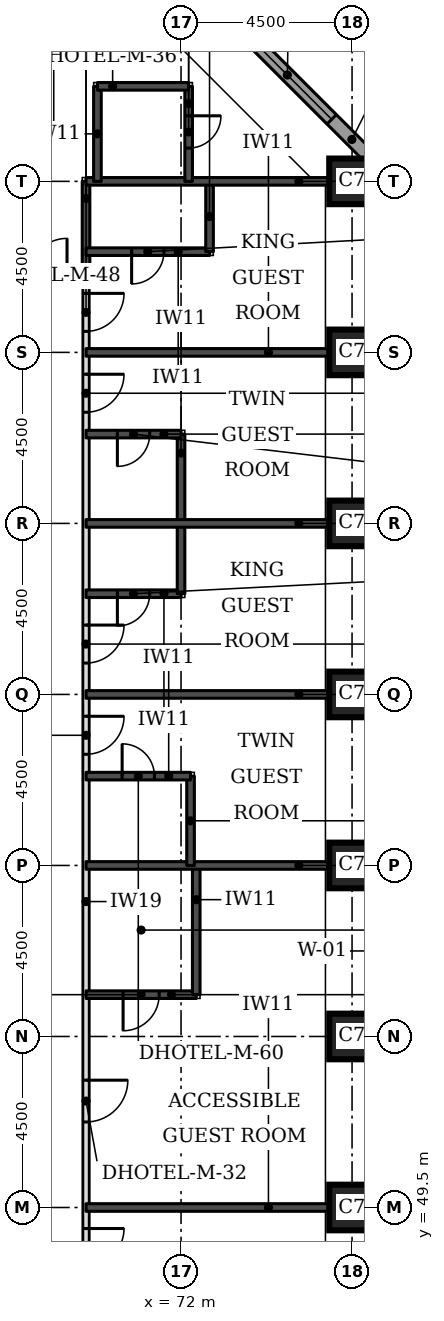
"""IFC4 building model, lengths in metres.
Left out: names, types, materials, properties, quantities, classifications, styles, units other than length and angle.
Written with IfcOpenShell. Run it as: python <this file> out.ifc"""

import sys

from ifc_helpers import new_model, si_unit, direction, frame, frame_2d, origin, origin_2d, place, context, subcontext, project, spatial, rectangle, extrude, element, fill, save


model = new_model("IFC4")
c1 = context("Model", 3, precision=1e-05, world=origin(), true_north=direction((0.0, 1.0)))
c2 = subcontext(c1, "Body", "Model", "MODEL_VIEW")
j1 = project(units=[si_unit("LENGTHUNIT", "METRE"), si_unit("PLANEANGLEUNIT", "RADIAN")], contexts=[c1])
p1 = place(None, origin())
s1 = spatial("IfcSite", under=j1, at=p1, CompositionType="ELEMENT")
p2 = place(p1, origin())
s2 = spatial("IfcBuilding", under=s1, at=p2, CompositionType="ELEMENT")
p3 = place(p2, frame((0.0, 0.0, 23.1)))
s3 = spatial("IfcBuildingStorey", under=s2, at=p3, CompositionType="ELEMENT", Elevation=23.1)
for number, where, z_axis, x_axis in (
    (1, (76.5, 49.5, 0.0), (0.0, 0.0, 1.0), (1.0, 0.0, 0.0)),
    (2, (76.5, 54.0, 0.0), (0.0, 0.0, 1.0), (1.0, 0.0, 0.0)),
    (3, (76.5, 58.5, 0.0), (0.0, 0.0, 1.0), (1.0, 0.0, 0.0)),
    (4, (76.5, 63.0, 0.0), (0.0, 0.0, 1.0), (1.0, 0.0, 0.0)),
    (5, (76.5, 67.5, 0.0), (0.0, 0.0, 1.0), (1.0, 0.0, 0.0)),
    (6, (76.5, 72.0, 0.0), (0.0, 0.0, 1.0), (1.0, 0.0, 0.0)),
    (7, (76.5, 76.5, 0.0), (0.0, 0.0, 1.0), (1.0, 0.0, 0.0)),
):
    element("IfcColumn", number, at=place(p3, frame(where, z_axis=z_axis, x_axis=x_axis)), inside=s3, PredefinedType="COLUMN", context=c2, shape_type="SweptSolid", body=[
        extrude(rectangle(XDim=1.2, YDim=1.2, at=origin_2d()), origin(), (0.0, 0.0, 1.0), 3.3),
    ])
p4 = place(p3, frame((77.326, 76.77, 0.0), z_axis=(0.0, 0.0, 1.0), x_axis=(-0.707106781187, 0.707106781187, 0.0)))
e8 = element("IfcWall", 8, at=p4, inside=s3, PredefinedType="STANDARD", context=c2, shape_type="SweptSolid", body=[
    extrude(rectangle(XDim=7.151, YDim=0.35, at=frame_2d((3.576, 0.0))), origin(), (0.0, 0.0, 1.0), 3.055),
])
p5 = place(p4, frame((1.926, 0.0, 0.8)))
e9 = element("IfcOpeningElement", 9, at=p5, cuts=e8, PredefinedType="OPENING", context=c2, shape_type="SweptSolid", body=[
    extrude(rectangle(XDim=3.3, YDim=1.5, at=frame_2d((1.65, 0.75))), frame((0.0, 0.185, 0.0), z_axis=(0.0, -1.0, 0.0), x_axis=(1.0, 0.0, 0.0)), (0.0, 0.0, 1.0), 0.37),
])
p6 = place(p3, frame((69.5, 47.5, 0.0), z_axis=(0.0, 0.0, 1.0), x_axis=(0.0, 1.0, 0.0)))
e10 = element("IfcWall", 10, at=p6, inside=s3, PredefinedType="PARTITIONING", context=c2, shape_type="SweptSolid", body=[
    extrude(rectangle(XDim=26.5, YDim=0.15, at=frame_2d((13.25, 0.0))), origin(), (0.0, 0.0, 1.0), 3.08),
])
p7 = place(p6, frame((25.053, 0.0, 0.0)))
e11 = element("IfcOpeningElement", 11, at=p7, cuts=e10, PredefinedType="OPENING", context=c2, shape_type="SweptSolid", body=[
    extrude(rectangle(XDim=1.0, YDim=2.1, at=frame_2d((0.5, 1.05))), frame((0.0, 0.085, 0.0), z_axis=(0.0, -1.0, 0.0), x_axis=(1.0, 0.0, 0.0)), (0.0, 0.0, 1.0), 0.17),
])
p8 = place(p6, frame((22.925, 0.0, 0.0)))
e12 = element("IfcOpeningElement", 12, at=p8, cuts=e10, PredefinedType="OPENING", context=c2, shape_type="SweptSolid", body=[
    extrude(rectangle(XDim=1.0, YDim=2.1, at=frame_2d((0.5, 1.05))), frame((0.0, 0.085, 0.0), z_axis=(0.0, -1.0, 0.0), x_axis=(1.0, 0.0, 0.0)), (0.0, 0.0, 1.0), 0.17),
])
p9 = place(p6, frame((16.325, 0.0, 0.0)))
e13 = element("IfcOpeningElement", 13, at=p9, cuts=e10, PredefinedType="OPENING", context=c2, shape_type="SweptSolid", body=[
    extrude(rectangle(XDim=1.0, YDim=2.1, at=frame_2d((0.5, 1.05))), frame((0.0, 0.085, 0.0), z_axis=(0.0, -1.0, 0.0), x_axis=(1.0, 0.0, 0.0)), (0.0, 0.0, 1.0), 0.17),
])
p10 = place(p6, frame((13.925, 0.0, 0.0)))
e14 = element("IfcOpeningElement", 14, at=p10, cuts=e10, PredefinedType="OPENING", context=c2, shape_type="SweptSolid", body=[
    extrude(rectangle(XDim=1.0, YDim=2.1, at=frame_2d((0.5, 1.05))), frame((0.0, 0.085, 0.0), z_axis=(0.0, -1.0, 0.0), x_axis=(1.0, 0.0, 0.0)), (0.0, 0.0, 1.0), 0.17),
])
p11 = place(p6, frame((4.25, 0.0, 0.0)))
e15 = element("IfcOpeningElement", 15, at=p11, cuts=e10, PredefinedType="OPENING", context=c2, shape_type="SweptSolid", body=[
    extrude(rectangle(XDim=1.1, YDim=2.1, at=frame_2d((0.55, 1.05))), frame((0.0, 0.085, 0.0), z_axis=(0.0, -1.0, 0.0), x_axis=(1.0, 0.0, 0.0)), (0.0, 0.0, 1.0), 0.17),
])
p12 = place(p6, frame((0.447, 0.0, 0.0)))
e16 = element("IfcOpeningElement", 16, at=p12, cuts=e10, PredefinedType="OPENING", context=c2, shape_type="SweptSolid", body=[
    extrude(rectangle(XDim=1.0, YDim=2.1, at=frame_2d((0.5, 1.05))), frame((0.0, 0.085, 0.0), z_axis=(0.0, -1.0, 0.0), x_axis=(1.0, 0.0, 0.0)), (0.0, 0.0, 1.0), 0.17),
])
p13 = place(p3, frame((43.0, 74.0, 0.0), z_axis=(0.0, 0.0, 1.0), x_axis=(1.0, 0.0, 0.0)))
e17 = element("IfcWall", 17, at=p13, inside=s3, PredefinedType="PARTITIONING", context=c2, shape_type="SweptSolid", body=[
    extrude(rectangle(XDim=26.5, YDim=0.15, at=frame_2d((13.25, 0.0))), origin(), (0.0, 0.0, 1.0), 3.08),
])
p14 = place(p13, frame((4.925, 0.0, 0.0)))
e18 = element("IfcOpeningElement", 18, at=p14, cuts=e17, PredefinedType="OPENING", context=c2, shape_type="SweptSolid", body=[
    extrude(rectangle(XDim=1.0, YDim=2.1, at=frame_2d((0.5, 1.05))), frame((0.0, 0.085, 0.0), z_axis=(0.0, -1.0, 0.0), x_axis=(1.0, 0.0, 0.0)), (0.0, 0.0, 1.0), 0.17),
])
p15 = place(p13, frame((7.325, 0.0, 0.0)))
e19 = element("IfcOpeningElement", 19, at=p15, cuts=e17, PredefinedType="OPENING", context=c2, shape_type="SweptSolid", body=[
    extrude(rectangle(XDim=1.0, YDim=2.1, at=frame_2d((0.5, 1.05))), frame((0.0, 0.085, 0.0), z_axis=(0.0, -1.0, 0.0), x_axis=(1.0, 0.0, 0.0)), (0.0, 0.0, 1.0), 0.17),
])
p16 = place(p13, frame((13.925, 0.0, 0.0)))
e20 = element("IfcOpeningElement", 20, at=p16, cuts=e17, PredefinedType="OPENING", context=c2, shape_type="SweptSolid", body=[
    extrude(rectangle(XDim=1.0, YDim=2.1, at=frame_2d((0.5, 1.05))), frame((0.0, 0.085, 0.0), z_axis=(0.0, -1.0, 0.0), x_axis=(1.0, 0.0, 0.0)), (0.0, 0.0, 1.0), 0.17),
])
p17 = place(p13, frame((16.325, 0.0, 0.0)))
e21 = element("IfcOpeningElement", 21, at=p17, cuts=e17, PredefinedType="OPENING", context=c2, shape_type="SweptSolid", body=[
    extrude(rectangle(XDim=1.0, YDim=2.1, at=frame_2d((0.5, 1.05))), frame((0.0, 0.085, 0.0), z_axis=(0.0, -1.0, 0.0), x_axis=(1.0, 0.0, 0.0)), (0.0, 0.0, 1.0), 0.17),
])
p18 = place(p13, frame((22.925, 0.0, 0.0)))
e22 = element("IfcOpeningElement", 22, at=p18, cuts=e17, PredefinedType="OPENING", context=c2, shape_type="SweptSolid", body=[
    extrude(rectangle(XDim=1.0, YDim=2.1, at=frame_2d((0.5, 1.05))), frame((0.0, 0.085, 0.0), z_axis=(0.0, -1.0, 0.0), x_axis=(1.0, 0.0, 0.0)), (0.0, 0.0, 1.0), 0.17),
])
p19 = place(p13, frame((0.5, 0.0, 0.0)))
e23 = element("IfcOpeningElement", 23, at=p19, cuts=e17, PredefinedType="OPENING", context=c2, shape_type="SweptSolid", body=[
    extrude(rectangle(XDim=1.0, YDim=2.1, at=frame_2d((0.5, 1.05))), frame((0.0, 0.085, 0.0), z_axis=(0.0, -1.0, 0.0), x_axis=(1.0, 0.0, 0.0)), (0.0, 0.0, 1.0), 0.17),
])
p20 = place(p13, frame((25.0, 0.0, 0.0)))
e24 = element("IfcOpeningElement", 24, at=p20, cuts=e17, PredefinedType="OPENING", context=c2, shape_type="SweptSolid", body=[
    extrude(rectangle(XDim=1.0, YDim=2.1, at=frame_2d((0.5, 1.05))), frame((0.0, 0.085, 0.0), z_axis=(0.0, -1.0, 0.0), x_axis=(1.0, 0.0, 0.0)), (0.0, 0.0, 1.0), 0.17),
])
p21 = place(p3, frame((69.5, 49.5, 0.0), z_axis=(0.0, 0.0, 1.0), x_axis=(1.0, 0.0, 0.0)))
e25 = element("IfcWall", 25, at=p21, inside=s3, PredefinedType="SOLIDWALL", context=c2, shape_type="SweptSolid", body=[
    extrude(rectangle(XDim=6.4, YDim=0.2, at=frame_2d((3.2, 0.0))), origin(), (0.0, 0.0, 1.0), 3.08),
])
p22 = place(p3, frame((69.5, 55.1, 0.0), z_axis=(0.0, 0.0, 1.0), x_axis=(1.0, 0.0, 0.0)))
e26 = element("IfcWall", 26, at=p22, inside=s3, PredefinedType="SOLIDWALL", context=c2, shape_type="SweptSolid", body=[
    extrude(rectangle(XDim=2.9, YDim=0.2, at=frame_2d((1.45, 0.0))), origin(), (0.0, 0.0, 1.0), 3.08),
])
p23 = place(p22, frame((0.975, 0.0, 0.0)))
e27 = element("IfcOpeningElement", 27, at=p23, cuts=e26, PredefinedType="OPENING", context=c2, shape_type="SweptSolid", body=[
    extrude(rectangle(XDim=0.95, YDim=2.1, at=frame_2d((0.475, 1.05))), frame((0.0, 0.11, 0.0), z_axis=(0.0, -1.0, 0.0), x_axis=(1.0, 0.0, 0.0)), (0.0, 0.0, 1.0), 0.22),
])
p24 = place(p3, frame((72.4, 55.1, 0.0), z_axis=(0.0, 0.0, 1.0), x_axis=(0.0, 1.0, 0.0)))
e28 = element("IfcWall", 28, at=p24, inside=s3, PredefinedType="SOLIDWALL", context=c2, shape_type="SweptSolid", body=[
    extrude(rectangle(XDim=3.4, YDim=0.2, at=frame_2d((1.7, 0.0))), origin(), (0.0, 0.0, 1.0), 3.08),
])
p25 = place(p3, frame((69.5, 58.5, 0.0), z_axis=(0.0, 0.0, 1.0), x_axis=(1.0, 0.0, 0.0)))
e29 = element("IfcWall", 29, at=p25, inside=s3, PredefinedType="SOLIDWALL", context=c2, shape_type="SweptSolid", body=[
    extrude(rectangle(XDim=6.4, YDim=0.2, at=frame_2d((3.2, 0.0))), origin(), (0.0, 0.0, 1.0), 3.08),
])
p26 = place(p3, frame((72.25, 58.5, 0.0), z_axis=(0.0, 0.0, 1.0), x_axis=(0.0, 1.0, 0.0)))
e30 = element("IfcWall", 30, at=p26, inside=s3, PredefinedType="SOLIDWALL", context=c2, shape_type="SweptSolid", body=[
    extrude(rectangle(XDim=2.35, YDim=0.2, at=frame_2d((1.175, 0.0))), origin(), (0.0, 0.0, 1.0), 3.08),
])
p27 = place(p3, frame((69.5, 60.85, 0.0), z_axis=(0.0, 0.0, 1.0), x_axis=(1.0, 0.0, 0.0)))
e31 = element("IfcWall", 31, at=p27, inside=s3, PredefinedType="SOLIDWALL", context=c2, shape_type="SweptSolid", body=[
    extrude(rectangle(XDim=2.75, YDim=0.2, at=frame_2d((1.375, 0.0))), origin(), (0.0, 0.0, 1.0), 3.08),
])
p28 = place(p27, frame((0.95, 0.0, 0.0)))
e32 = element("IfcOpeningElement", 32, at=p28, cuts=e31, PredefinedType="OPENING", context=c2, shape_type="SweptSolid", body=[
    extrude(rectangle(XDim=0.85, YDim=2.1, at=frame_2d((0.425, 1.05))), frame((0.0, 0.11, 0.0), z_axis=(0.0, -1.0, 0.0), x_axis=(1.0, 0.0, 0.0)), (0.0, 0.0, 1.0), 0.22),
])
p29 = place(p3, frame((69.5, 63.0, 0.0), z_axis=(0.0, 0.0, 1.0), x_axis=(1.0, 0.0, 0.0)))
e33 = element("IfcWall", 33, at=p29, inside=s3, PredefinedType="SOLIDWALL", context=c2, shape_type="SweptSolid", body=[
    extrude(rectangle(XDim=6.4, YDim=0.2, at=frame_2d((3.2, 0.0))), origin(), (0.0, 0.0, 1.0), 3.08),
])
p30 = place(p3, frame((69.5, 65.65, 0.0), z_axis=(0.0, 0.0, 1.0), x_axis=(1.0, 0.0, 0.0)))
e34 = element("IfcWall", 34, at=p30, inside=s3, PredefinedType="SOLIDWALL", context=c2, shape_type="SweptSolid", body=[
    extrude(rectangle(XDim=2.5, YDim=0.2, at=frame_2d((1.25, 0.0))), origin(), (0.0, 0.0, 1.0), 3.08),
])
p31 = place(p30, frame((0.825, 0.0, 0.0)))
e35 = element("IfcOpeningElement", 35, at=p31, cuts=e34, PredefinedType="OPENING", context=c2, shape_type="SweptSolid", body=[
    extrude(rectangle(XDim=0.85, YDim=2.1, at=frame_2d((0.425, 1.05))), frame((0.0, 0.11, 0.0), z_axis=(0.0, -1.0, 0.0), x_axis=(1.0, 0.0, 0.0)), (0.0, 0.0, 1.0), 0.22),
])
p32 = place(p3, frame((72.0, 65.65, 0.0), z_axis=(0.0, 0.0, 1.0), x_axis=(0.0, 1.0, 0.0)))
e36 = element("IfcWall", 36, at=p32, inside=s3, PredefinedType="SOLIDWALL", context=c2, shape_type="SweptSolid", body=[
    extrude(rectangle(XDim=4.2, YDim=0.2, at=frame_2d((2.1, 0.0))), origin(), (0.0, 0.0, 1.0), 3.08),
])
p33 = place(p3, frame((69.5, 67.5, 0.0), z_axis=(0.0, 0.0, 1.0), x_axis=(1.0, 0.0, 0.0)))
e37 = element("IfcWall", 37, at=p33, inside=s3, PredefinedType="SOLIDWALL", context=c2, shape_type="SweptSolid", body=[
    extrude(rectangle(XDim=6.4, YDim=0.2, at=frame_2d((3.2, 0.0))), origin(), (0.0, 0.0, 1.0), 3.08),
])
p34 = place(p3, frame((69.5, 69.85, 0.0), z_axis=(0.0, 0.0, 1.0), x_axis=(1.0, 0.0, 0.0)))
e38 = element("IfcWall", 38, at=p34, inside=s3, PredefinedType="SOLIDWALL", context=c2, shape_type="SweptSolid", body=[
    extrude(rectangle(XDim=2.5, YDim=0.2, at=frame_2d((1.25, 0.0))), origin(), (0.0, 0.0, 1.0), 3.08),
])
p35 = place(p34, frame((0.825, 0.0, 0.0)))
e39 = element("IfcOpeningElement", 39, at=p35, cuts=e38, PredefinedType="OPENING", context=c2, shape_type="SweptSolid", body=[
    extrude(rectangle(XDim=0.85, YDim=2.1, at=frame_2d((0.425, 1.05))), frame((0.0, 0.11, 0.0), z_axis=(0.0, -1.0, 0.0), x_axis=(1.0, 0.0, 0.0)), (0.0, 0.0, 1.0), 0.22),
])
p36 = place(p3, frame((69.5, 72.0, 0.0), z_axis=(0.0, 0.0, 1.0), x_axis=(1.0, 0.0, 0.0)))
e40 = element("IfcWall", 40, at=p36, inside=s3, PredefinedType="SOLIDWALL", context=c2, shape_type="SweptSolid", body=[
    extrude(rectangle(XDim=6.4, YDim=0.2, at=frame_2d((3.2, 0.0))), origin(), (0.0, 0.0, 1.0), 3.08),
])
p37 = place(p3, frame((69.5, 74.0, 0.0), z_axis=(0.0, 0.0, 1.0), x_axis=(0.0, 1.0, 0.0)))
e41 = element("IfcWall", 41, at=p37, inside=s3, PredefinedType="SOLIDWALL", context=c2, shape_type="SweptSolid", body=[
    extrude(rectangle(XDim=2.5, YDim=0.2, at=frame_2d((1.25, 0.0))), origin(), (0.0, 0.0, 1.0), 3.08),
])
p38 = place(p3, frame((69.5, 74.65, 0.0), z_axis=(0.0, 0.0, 1.0), x_axis=(1.0, 0.0, 0.0)))
e42 = element("IfcWall", 42, at=p38, inside=s3, PredefinedType="SOLIDWALL", context=c2, shape_type="SweptSolid", body=[
    extrude(rectangle(XDim=3.25, YDim=0.2, at=frame_2d((1.625, 0.0))), origin(), (0.0, 0.0, 1.0), 3.08),
])
p39 = place(p38, frame((1.2, 0.0, 0.0)))
e43 = element("IfcOpeningElement", 43, at=p39, cuts=e42, PredefinedType="OPENING", context=c2, shape_type="SweptSolid", body=[
    extrude(rectangle(XDim=0.85, YDim=2.1, at=frame_2d((0.425, 1.05))), frame((0.0, 0.11, 0.0), z_axis=(0.0, -1.0, 0.0), x_axis=(1.0, 0.0, 0.0)), (0.0, 0.0, 1.0), 0.22),
])
p40 = place(p3, frame((72.75, 74.65, 0.0), z_axis=(0.0, 0.0, 1.0), x_axis=(0.0, 1.0, 0.0)))
e44 = element("IfcWall", 44, at=p40, inside=s3, PredefinedType="SOLIDWALL", context=c2, shape_type="SweptSolid", body=[
    extrude(rectangle(XDim=1.85, YDim=0.2, at=frame_2d((0.925, 0.0))), origin(), (0.0, 0.0, 1.0), 3.08),
])
p41 = place(p3, frame((69.5, 76.5, 0.0), z_axis=(0.0, 0.0, 1.0), x_axis=(1.0, 0.0, 0.0)))
e45 = element("IfcWall", 45, at=p41, inside=s3, PredefinedType="SOLIDWALL", context=c2, shape_type="SweptSolid", body=[
    extrude(rectangle(XDim=6.4, YDim=0.2, at=frame_2d((3.2, 0.0))), origin(), (0.0, 0.0, 1.0), 3.08),
])
p42 = place(p3, frame((69.8, 76.5, 0.0), z_axis=(0.0, 0.0, 1.0), x_axis=(0.0, 1.0, 0.0)))
e46 = element("IfcWall", 46, at=p42, inside=s3, PredefinedType="SOLIDWALL", context=c2, shape_type="SweptSolid", body=[
    extrude(rectangle(XDim=2.5, YDim=0.2, at=frame_2d((1.25, 0.0))), origin(), (0.0, 0.0, 1.0), 3.08),
])
p43 = place(p3, frame((72.2, 76.5, 0.0), z_axis=(0.0, 0.0, 1.0), x_axis=(0.0, 1.0, 0.0)))
e47 = element("IfcWall", 47, at=p43, inside=s3, PredefinedType="SOLIDWALL", context=c2, shape_type="SweptSolid", body=[
    extrude(rectangle(XDim=2.5, YDim=0.2, at=frame_2d((1.25, 0.0))), origin(), (0.0, 0.0, 1.0), 3.08),
])
p44 = place(p43, frame((0.875, 0.0, 0.0)))
e48 = element("IfcOpeningElement", 48, at=p44, cuts=e47, PredefinedType="OPENING", context=c2, shape_type="SweptSolid", body=[
    extrude(rectangle(XDim=0.85, YDim=2.1, at=frame_2d((0.425, 1.05))), frame((0.0, 0.11, 0.0), z_axis=(0.0, -1.0, 0.0), x_axis=(1.0, 0.0, 0.0)), (0.0, 0.0, 1.0), 0.22),
])
p45 = place(p3, frame((69.8, 79.0, 0.0), z_axis=(0.0, 0.0, 1.0), x_axis=(1.0, 0.0, 0.0)))
e49 = element("IfcWall", 49, at=p45, inside=s3, PredefinedType="SOLIDWALL", context=c2, shape_type="SweptSolid", body=[
    extrude(rectangle(XDim=2.4, YDim=0.2, at=frame_2d((1.2, 0.0))), origin(), (0.0, 0.0, 1.0), 3.08),
])
p46 = place(p5, origin())
e50 = element("IfcWindow", 50, at=p46, inside=s3, PartitioningType="SINGLE_PANEL", PredefinedType="WINDOW", context=c2, shape_type="SweptSolid", body=[
    extrude(rectangle(XDim=3.3, YDim=1.5, at=frame_2d((1.65, 0.75))), frame((0.0, 0.085, 0.0), z_axis=(0.0, -1.0, 0.0), x_axis=(1.0, 0.0, 0.0)), (0.0, 0.0, 1.0), 0.06),
])
fill(e9, e50)
p47 = place(p7, frame((1.0, 0.0, 0.0), z_axis=(0.0, 0.0, 1.0), x_axis=(-1.0, 0.0, 0.0)))
e51 = element("IfcDoor", 51, at=p47, inside=s3, OperationType="SINGLE_SWING_LEFT", PredefinedType="DOOR", context=c2, shape_type="SweptSolid", body=[
    extrude(rectangle(XDim=1.0, YDim=2.1, at=frame_2d((0.5, 1.05))), frame((0.0, 0.025, 0.0), z_axis=(0.0, -1.0, 0.0), x_axis=(1.0, 0.0, 0.0)), (0.0, 0.0, 1.0), 0.05),
])
fill(e11, e51)
p48 = place(p39, frame((0.85, 0.0, 0.0), z_axis=(0.0, 0.0, 1.0), x_axis=(-1.0, 0.0, 0.0)))
e52 = element("IfcDoor", 52, at=p48, inside=s3, OperationType="SINGLE_SWING_RIGHT", PredefinedType="DOOR", context=c2, shape_type="SweptSolid", body=[
    extrude(rectangle(XDim=0.85, YDim=2.1, at=frame_2d((0.425, 1.05))), frame((0.0, 0.025, 0.0), z_axis=(0.0, -1.0, 0.0), x_axis=(1.0, 0.0, 0.0)), (0.0, 0.0, 1.0), 0.05),
])
fill(e43, e52)
p49 = place(p8, frame((1.0, 0.0, 0.0), z_axis=(0.0, 0.0, 1.0), x_axis=(-1.0, 0.0, 0.0)))
e53 = element("IfcDoor", 53, at=p49, inside=s3, OperationType="SINGLE_SWING_LEFT", PredefinedType="DOOR", context=c2, shape_type="SweptSolid", body=[
    extrude(rectangle(XDim=1.0, YDim=2.1, at=frame_2d((0.5, 1.05))), frame((0.0, 0.025, 0.0), z_axis=(0.0, -1.0, 0.0), x_axis=(1.0, 0.0, 0.0)), (0.0, 0.0, 1.0), 0.05),
])
fill(e12, e53)
p50 = place(p35, frame((0.85, 0.0, 0.0), z_axis=(0.0, 0.0, 1.0), x_axis=(-1.0, 0.0, 0.0)))
e54 = element("IfcDoor", 54, at=p50, inside=s3, OperationType="SINGLE_SWING_RIGHT", PredefinedType="DOOR", context=c2, shape_type="SweptSolid", body=[
    extrude(rectangle(XDim=0.85, YDim=2.1, at=frame_2d((0.425, 1.05))), frame((0.0, 0.025, 0.0), z_axis=(0.0, -1.0, 0.0), x_axis=(1.0, 0.0, 0.0)), (0.0, 0.0, 1.0), 0.05),
])
fill(e39, e54)
p51 = place(p9, frame((1.0, 0.0, 0.0), z_axis=(0.0, 0.0, 1.0), x_axis=(-1.0, 0.0, 0.0)))
e55 = element("IfcDoor", 55, at=p51, inside=s3, OperationType="SINGLE_SWING_LEFT", PredefinedType="DOOR", context=c2, shape_type="SweptSolid", body=[
    extrude(rectangle(XDim=1.0, YDim=2.1, at=frame_2d((0.5, 1.05))), frame((0.0, 0.025, 0.0), z_axis=(0.0, -1.0, 0.0), x_axis=(1.0, 0.0, 0.0)), (0.0, 0.0, 1.0), 0.05),
])
fill(e13, e55)
p52 = place(p31, frame((0.85, 0.0, 0.0), z_axis=(0.0, 0.0, 1.0), x_axis=(-1.0, 0.0, 0.0)))
e56 = element("IfcDoor", 56, at=p52, inside=s3, OperationType="SINGLE_SWING_RIGHT", PredefinedType="DOOR", context=c2, shape_type="SweptSolid", body=[
    extrude(rectangle(XDim=0.85, YDim=2.1, at=frame_2d((0.425, 1.05))), frame((0.0, 0.025, 0.0), z_axis=(0.0, -1.0, 0.0), x_axis=(1.0, 0.0, 0.0)), (0.0, 0.0, 1.0), 0.05),
])
fill(e35, e56)
p53 = place(p10, frame((1.0, 0.0, 0.0), z_axis=(0.0, 0.0, 1.0), x_axis=(-1.0, 0.0, 0.0)))
e57 = element("IfcDoor", 57, at=p53, inside=s3, OperationType="SINGLE_SWING_LEFT", PredefinedType="DOOR", context=c2, shape_type="SweptSolid", body=[
    extrude(rectangle(XDim=1.0, YDim=2.1, at=frame_2d((0.5, 1.05))), frame((0.0, 0.025, 0.0), z_axis=(0.0, -1.0, 0.0), x_axis=(1.0, 0.0, 0.0)), (0.0, 0.0, 1.0), 0.05),
])
fill(e14, e57)
p54 = place(p28, origin())
e58 = element("IfcDoor", 58, at=p54, inside=s3, OperationType="SINGLE_SWING_LEFT", PredefinedType="DOOR", context=c2, shape_type="SweptSolid", body=[
    extrude(rectangle(XDim=0.85, YDim=2.1, at=frame_2d((0.425, 1.05))), frame((0.0, 0.025, 0.0), z_axis=(0.0, -1.0, 0.0), x_axis=(1.0, 0.0, 0.0)), (0.0, 0.0, 1.0), 0.05),
])
fill(e32, e58)
p55 = place(p11, frame((1.1, 0.0, 0.0), z_axis=(0.0, 0.0, 1.0), x_axis=(-1.0, 0.0, 0.0)))
e59 = element("IfcDoor", 59, at=p55, inside=s3, OperationType="SINGLE_SWING_LEFT", PredefinedType="DOOR", context=c2, shape_type="SweptSolid", body=[
    extrude(rectangle(XDim=1.1, YDim=2.1, at=frame_2d((0.55, 1.05))), frame((0.0, 0.025, 0.0), z_axis=(0.0, -1.0, 0.0), x_axis=(1.0, 0.0, 0.0)), (0.0, 0.0, 1.0), 0.05),
])
fill(e15, e59)
p56 = place(p23, frame((0.95, 0.0, 0.0), z_axis=(0.0, 0.0, 1.0), x_axis=(-1.0, 0.0, 0.0)))
e60 = element("IfcDoor", 60, at=p56, inside=s3, OperationType="SINGLE_SWING_RIGHT", PredefinedType="DOOR", context=c2, shape_type="SweptSolid", body=[
    extrude(rectangle(XDim=0.95, YDim=2.1, at=frame_2d((0.475, 1.05))), frame((0.0, 0.025, 0.0), z_axis=(0.0, -1.0, 0.0), x_axis=(1.0, 0.0, 0.0)), (0.0, 0.0, 1.0), 0.05),
])
fill(e27, e60)
p57 = place(p12, frame((1.0, 0.0, 0.0), z_axis=(0.0, 0.0, 1.0), x_axis=(-1.0, 0.0, 0.0)))
e61 = element("IfcDoor", 61, at=p57, inside=s3, OperationType="SINGLE_SWING_LEFT", PredefinedType="DOOR", context=c2, shape_type="SweptSolid", body=[
    extrude(rectangle(XDim=1.0, YDim=2.1, at=frame_2d((0.5, 1.05))), frame((0.0, 0.025, 0.0), z_axis=(0.0, -1.0, 0.0), x_axis=(1.0, 0.0, 0.0)), (0.0, 0.0, 1.0), 0.05),
])
fill(e16, e61)
p58 = place(p20, origin())
e62 = element("IfcDoor", 62, at=p58, inside=s3, OperationType="SINGLE_SWING_RIGHT", PredefinedType="DOOR", context=c2, shape_type="SweptSolid", body=[
    extrude(rectangle(XDim=1.0, YDim=2.1, at=frame_2d((0.5, 1.05))), frame((0.0, 0.025, 0.0), z_axis=(0.0, -1.0, 0.0), x_axis=(1.0, 0.0, 0.0)), (0.0, 0.0, 1.0), 0.05),
])
fill(e24, e62)
p59 = place(p44, frame((0.85, 0.0, 0.0), z_axis=(0.0, 0.0, 1.0), x_axis=(-1.0, 0.0, 0.0)))
e63 = element("IfcDoor", 63, at=p59, inside=s3, OperationType="SINGLE_SWING_LEFT", PredefinedType="DOOR", context=c2, shape_type="SweptSolid", body=[
    extrude(rectangle(XDim=0.85, YDim=2.1, at=frame_2d((0.425, 1.05))), frame((0.0, 0.025, 0.0), z_axis=(0.0, -1.0, 0.0), x_axis=(1.0, 0.0, 0.0)), (0.0, 0.0, 1.0), 0.05),
])
fill(e48, e63)
save(model, sys.argv[1])
